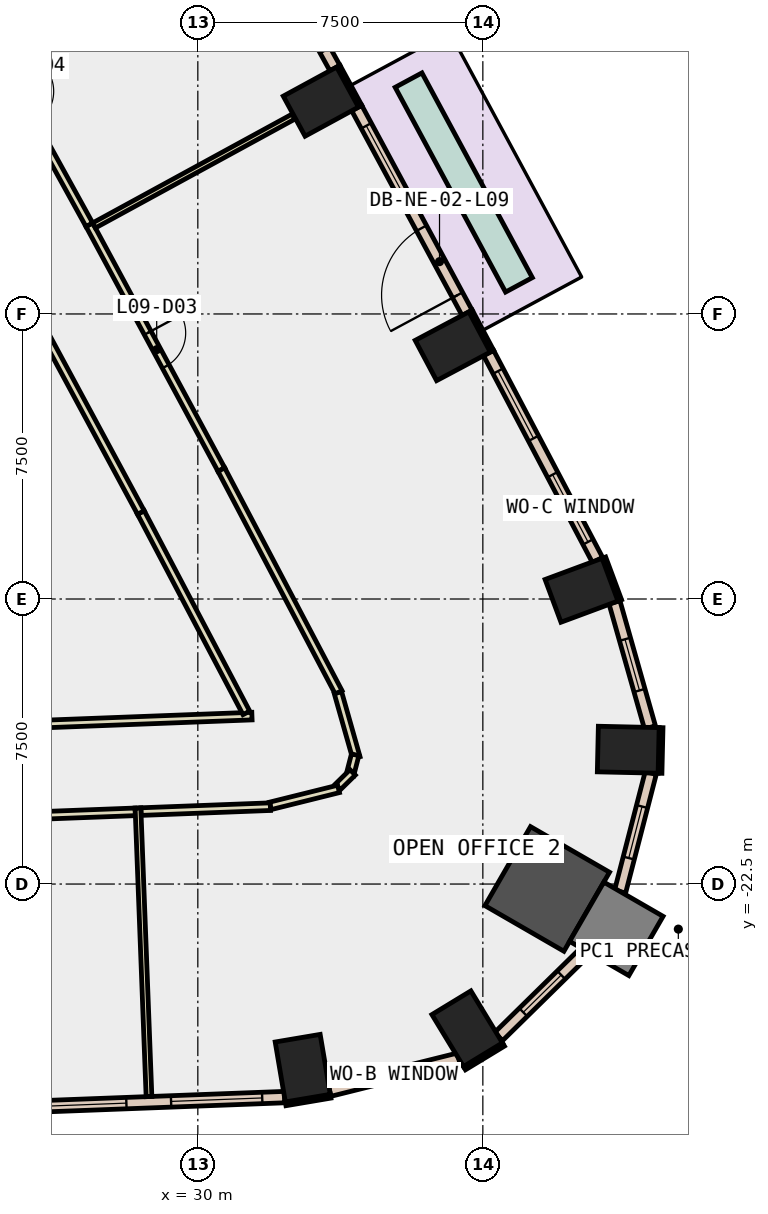
"""IFC4 building model, lengths in metres.
Left out: names, types, materials, properties, quantities, classifications, styles, units other than length and angle.
Written with IfcOpenShell. Run it as: python <this file> out.ifc"""

import sys

from ifc_helpers import new_model, si_unit, direction, frame, frame_2d, origin, origin_2d, place, context, subcontext, project, spatial, rectangle, extrude, element, fill, save


model = new_model("IFC4")
c1 = context("Model", 3, precision=1e-05, world=origin(), true_north=direction((0.0, 1.0)))
c2 = subcontext(c1, "Body", "Model", "MODEL_VIEW")
j1 = project(units=[si_unit("LENGTHUNIT", "METRE"), si_unit("PLANEANGLEUNIT", "RADIAN")], contexts=[c1])
p1 = place(None, origin())
s1 = spatial("IfcSite", under=j1, at=p1, CompositionType="ELEMENT")
p2 = place(p1, origin())
s2 = spatial("IfcBuilding", under=s1, at=p2, CompositionType="ELEMENT")
p3 = place(p2, frame((0.0, 0.0, 47.6)))
s3 = spatial("IfcBuildingStorey", under=s2, at=p3, CompositionType="ELEMENT", Elevation=47.6)
for number, where, z_axis, x_axis in (
    (1, (32.761, -27.345, -0.4), (0.0, 0.0, 1.0), (0.986, 0.167, 0.0)),
    (2, (37.088, -26.307, -0.4), (0.0, 0.0, 1.0), (0.855, 0.519, 0.0)),
):
    element("IfcColumn", number, at=place(p3, frame(where, z_axis=z_axis, x_axis=x_axis)), inside=s3, PredefinedType="COLUMN", context=c2, shape_type="SweptSolid", body=[
        extrude(rectangle(XDim=1.2, YDim=1.6, at=origin_2d()), origin(), (0.0, 0.0, 1.0), 4.2),
    ])
p4 = place(p3, frame((39.194, -22.629, -0.4), z_axis=(0.0, 0.0, 1.0), x_axis=(-0.866025403784, 0.5, 0.0)))
e3 = element("IfcColumn", 3, at=p4, inside=s3, PredefinedType="COLUMN", context=c2, shape_type="SweptSolid", body=[
    extrude(rectangle(XDim=2.4, YDim=2.4, at=origin_2d()), origin(), (0.0, 0.0, 1.0), 4.2),
])
for number, where, z_axis, x_axis in (
    (4, (41.326, -18.966, -0.4), (0.0, 0.0, 1.0), (0.023, 1.0, 0.0)),
    (5, (40.097, -14.77, -0.4), (0.0, 0.0, 1.0), (-0.348, 0.937, 0.0)),
    (6, (36.708, -8.349, -0.4), (0.0, 0.0, 1.0), (-0.469, 0.883, 0.0)),
    (7, (33.238, -1.913, -0.4), (0.0, 0.0, 1.0), (-0.478, 0.878, 0.0)),
):
    element("IfcColumn", number, at=place(p3, frame(where, z_axis=z_axis, x_axis=x_axis)), inside=s3, PredefinedType="COLUMN", context=c2, shape_type="SweptSolid", body=[
        extrude(rectangle(XDim=1.2, YDim=1.6, at=origin_2d()), origin(), (0.0, 0.0, 1.0), 4.2),
    ])
p5 = place(p3, frame((41.013, -23.679, -0.4), z_axis=(0.0, 0.0, 1.0), x_axis=(-0.866025403784, 0.5, 0.0)))
e8 = element("IfcColumn", 8, at=p5, inside=s3, PredefinedType="COLUMN", context=c2, shape_type="SweptSolid", body=[
    extrude(rectangle(XDim=1.8, YDim=1.8, at=origin_2d()), origin(), (0.0, 0.0, 1.0), 4.2),
])
p6 = place(p3, frame((41.103, -15.037, 0.0), z_axis=(0.0, 0.0, 1.0), x_axis=(-0.348268249601, 0.937394914814, 0.0)))
e9 = element("IfcWall", 9, at=p6, inside=s3, PredefinedType="STANDARD", context=c2, shape_type="SweptSolid", body=[
    extrude(rectangle(XDim=1.2, YDim=0.1, at=frame_2d((0.6, 0.0))), origin(), (0.0, 0.0, 1.0), 3.8),
])
p7 = place(p3, frame((37.74, -8.48, 0.0), z_axis=(0.0, 0.0, 1.0), x_axis=(-0.469383408131, 0.882994459876, 0.0)))
e10 = element("IfcWall", 10, at=p7, inside=s3, PredefinedType="STANDARD", context=c2, shape_type="SweptSolid", body=[
    extrude(rectangle(XDim=1.199, YDim=0.1, at=frame_2d((0.6, 0.0))), origin(), (0.0, 0.0, 1.0), 3.8),
])
p8 = place(p3, frame((34.271, -2.034, 0.0), z_axis=(0.0, 0.0, 1.0), x_axis=(-0.478267644701, 0.878214131082, 0.0)))
e11 = element("IfcWall", 11, at=p8, inside=s3, PredefinedType="STANDARD", context=c2, shape_type="SweptSolid", body=[
    extrude(rectangle(XDim=1.2, YDim=0.1, at=frame_2d((0.6, 0.0))), origin(), (0.0, 0.0, 1.0), 3.8),
])
p9 = place(p3, frame((32.311, -28.283, 0.0), z_axis=(0.0, 0.0, 1.0), x_axis=(0.986011774526, 0.166675674579, 0.0)))
e12 = element("IfcWall", 12, at=p9, inside=s3, PredefinedType="STANDARD", context=c2, shape_type="SweptSolid", body=[
    extrude(rectangle(XDim=1.2, YDim=0.1, at=frame_2d((0.6, 0.0))), origin(), (0.0, 0.0, 1.0), 3.8),
])
for number, where, z_axis, x_axis in (
    (13, (37.016, -27.345, 0.0), (0.0, 0.0, 1.0), (0.855, 0.519, 0.0)),
    (14, (42.162, -19.585, 0.0), (0.0, 0.0, 1.0), (0.023, 1.0, 0.0)),
):
    element("IfcWall", number, at=place(p3, frame(where, z_axis=z_axis, x_axis=x_axis)), inside=s3, PredefinedType="STANDARD", context=c2, shape_type="SweptSolid", body=[
        extrude(rectangle(XDim=1.2, YDim=0.1, at=frame_2d((0.6, 0.0))), origin(), (0.0, 0.0, 1.0), 3.8),
    ])
p10 = place(p3, frame((25.134, -28.378, 0.0), z_axis=(0.0, 0.0, 1.0), x_axis=(0.999276920032, 0.038021534562, 0.0)))
e15 = element("IfcWall", 15, at=p10, inside=s3, PredefinedType="STANDARD", context=c2, shape_type="SweptSolid", body=[
    extrude(rectangle(XDim=7.153, YDim=0.3, at=frame_2d((3.577, 0.0))), origin(), (0.0, 0.0, 1.0), 3.8),
])
p11 = place(p10, frame((0.588, 0.0, 0.9)))
e16 = element("IfcOpeningElement", 16, at=p11, cuts=e15, PredefinedType="OPENING", context=c2, shape_type="SweptSolid", body=[
    extrude(rectangle(XDim=2.4, YDim=2.6, at=frame_2d((1.2, 1.3))), frame((0.0, 0.16, 0.0), z_axis=(0.0, -1.0, 0.0), x_axis=(1.0, 0.0, 0.0)), (0.0, 0.0, 1.0), 0.32),
])
p12 = place(p10, frame((4.165, 0.0, 0.9)))
e17 = element("IfcOpeningElement", 17, at=p12, cuts=e15, PredefinedType="OPENING", context=c2, shape_type="SweptSolid", body=[
    extrude(rectangle(XDim=2.4, YDim=2.6, at=frame_2d((1.2, 1.3))), frame((0.0, 0.16, 0.0), z_axis=(0.0, -1.0, 0.0), x_axis=(1.0, 0.0, 0.0)), (0.0, 0.0, 1.0), 0.32),
])
p13 = place(p3, frame((33.469, -27.939, 0.0), z_axis=(0.0, 0.0, 1.0), x_axis=(0.970331016871, 0.241780308749, 0.0)))
e18 = element("IfcWall", 18, at=p13, inside=s3, PredefinedType="STANDARD", context=c2, shape_type="SweptSolid", body=[
    extrude(rectangle(XDim=3.499, YDim=0.3, at=frame_2d((1.75, 0.0))), origin(), (0.0, 0.0, 1.0), 3.8),
])
p14 = place(p13, frame((1.049, 0.0, 0.9)))
e19 = element("IfcOpeningElement", 19, at=p14, cuts=e18, PredefinedType="OPENING", context=c2, shape_type="SweptSolid", body=[
    extrude(rectangle(XDim=1.4, YDim=2.6, at=frame_2d((0.7, 1.3))), frame((0.0, 0.16, 0.0), z_axis=(0.0, -1.0, 0.0), x_axis=(1.0, 0.0, 0.0)), (0.0, 0.0, 1.0), 0.32),
])
p15 = place(p3, frame((37.914, -26.513, 0.0), z_axis=(0.0, 0.0, 1.0), x_axis=(0.71340487189, 0.700752087948, 0.0)))
e20 = element("IfcWall", 20, at=p15, inside=s3, PredefinedType="STANDARD", context=c2, shape_type="SweptSolid", body=[
    extrude(rectangle(XDim=3.222, YDim=0.3, at=frame_2d((1.611, 0.0))), origin(), (0.0, 0.0, 1.0), 3.8),
])
p16 = place(p15, frame((0.911, 0.0, 0.9)))
e21 = element("IfcOpeningElement", 21, at=p16, cuts=e20, PredefinedType="OPENING", context=c2, shape_type="SweptSolid", body=[
    extrude(rectangle(XDim=1.4, YDim=2.6, at=frame_2d((0.7, 1.3))), frame((0.0, 0.16, 0.0), z_axis=(0.0, -1.0, 0.0), x_axis=(1.0, 0.0, 0.0)), (0.0, 0.0, 1.0), 0.32),
])
p17 = place(p3, frame((41.112, -22.698, 0.0), z_axis=(0.0, 0.0, 1.0), x_axis=(0.250086521833, 0.968223492587, 0.0)))
e22 = element("IfcWall", 22, at=p17, inside=s3, PredefinedType="STANDARD", context=c2, shape_type="SweptSolid", body=[
    extrude(rectangle(XDim=3.222, YDim=0.3, at=frame_2d((1.611, 0.0))), origin(), (0.0, 0.0, 1.0), 3.8),
])
p18 = place(p17, frame((0.911, 0.0, 0.9)))
e23 = element("IfcOpeningElement", 23, at=p18, cuts=e22, PredefinedType="OPENING", context=c2, shape_type="SweptSolid", body=[
    extrude(rectangle(XDim=1.4, YDim=2.6, at=frame_2d((0.7, 1.3))), frame((0.0, 0.16, 0.0), z_axis=(0.0, -1.0, 0.0), x_axis=(1.0, 0.0, 0.0)), (0.0, 0.0, 1.0), 0.32),
])
p19 = place(p3, frame((41.898, -18.379, 0.0), z_axis=(0.0, 0.0, 1.0), x_axis=(-0.272901963142, 0.962041848629, 0.0)))
e24 = element("IfcWall", 24, at=p19, inside=s3, PredefinedType="STANDARD", context=c2, shape_type="SweptSolid", body=[
    extrude(rectangle(XDim=3.422, YDim=0.3, at=frame_2d((1.711, 0.0))), origin(), (0.0, 0.0, 1.0), 3.8),
])
p20 = place(p19, frame((1.011, 0.0, 0.9)))
e25 = element("IfcOpeningElement", 25, at=p20, cuts=e24, PredefinedType="OPENING", context=c2, shape_type="SweptSolid", body=[
    extrude(rectangle(XDim=1.4, YDim=2.6, at=frame_2d((0.7, 1.3))), frame((0.0, 0.16, 0.0), z_axis=(0.0, -1.0, 0.0), x_axis=(1.0, 0.0, 0.0)), (0.0, 0.0, 1.0), 0.32),
])
p21 = place(p3, frame((40.518, -13.975, 0.0), z_axis=(0.0, 0.0, 1.0), x_axis=(-0.465847756605, 0.884864886673, 0.0)))
e26 = element("IfcWall", 26, at=p21, inside=s3, PredefinedType="STANDARD", context=c2, shape_type="SweptSolid", body=[
    extrude(rectangle(XDim=6.157, YDim=0.3, at=frame_2d((3.079, 0.0))), origin(), (0.0, 0.0, 1.0), 3.8),
])
p22 = place(p21, frame((0.539, 0.0, 0.9)))
e27 = element("IfcOpeningElement", 27, at=p22, cuts=e26, PredefinedType="OPENING", context=c2, shape_type="SweptSolid", body=[
    extrude(rectangle(XDim=2.0, YDim=2.6, at=frame_2d((1.0, 1.3))), frame((0.0, 0.16, 0.0), z_axis=(0.0, -1.0, 0.0), x_axis=(1.0, 0.0, 0.0)), (0.0, 0.0, 1.0), 0.32),
])
p23 = place(p21, frame((3.618, 0.0, 0.9)))
e28 = element("IfcOpeningElement", 28, at=p23, cuts=e26, PredefinedType="OPENING", context=c2, shape_type="SweptSolid", body=[
    extrude(rectangle(XDim=2.0, YDim=2.6, at=frame_2d((1.0, 1.3))), frame((0.0, 0.16, 0.0), z_axis=(0.0, -1.0, 0.0), x_axis=(1.0, 0.0, 0.0)), (0.0, 0.0, 1.0), 0.32),
])
p24 = place(p3, frame((37.086, -7.47, 0.0), z_axis=(0.0, 0.0, 1.0), x_axis=(-0.474584950749, 0.880209704856, 0.0)))
e29 = element("IfcWall", 29, at=p24, inside=s3, PredefinedType="STANDARD", context=c2, shape_type="SweptSolid", body=[
    extrude(rectangle(XDim=6.121, YDim=0.3, at=frame_2d((3.061, 0.0))), origin(), (0.0, 0.0, 1.0), 3.8),
])
p25 = place(p24, frame((0.53, 0.0, 0.0)))
e30 = element("IfcOpeningElement", 30, at=p25, cuts=e29, PredefinedType="OPENING", context=c2, shape_type="SweptSolid", body=[
    extrude(rectangle(XDim=2.0, YDim=2.4, at=frame_2d((1.0, 1.2))), frame((0.0, 0.16, 0.0), z_axis=(0.0, -1.0, 0.0), x_axis=(1.0, 0.0, 0.0)), (0.0, 0.0, 1.0), 0.32),
])
p26 = place(p24, frame((3.591, 0.0, 0.9)))
e31 = element("IfcOpeningElement", 31, at=p26, cuts=e29, PredefinedType="OPENING", context=c2, shape_type="SweptSolid", body=[
    extrude(rectangle(XDim=2.0, YDim=2.6, at=frame_2d((1.0, 1.3))), frame((0.0, 0.16, 0.0), z_axis=(0.0, -1.0, 0.0), x_axis=(1.0, 0.0, 0.0)), (0.0, 0.0, 1.0), 0.32),
])
p27 = place(p3, frame((33.607, -1.03, 0.0), z_axis=(0.0, 0.0, 1.0), x_axis=(-0.483195456594, 0.875512507465, 0.0)))
e32 = element("IfcWall", 32, at=p27, inside=s3, PredefinedType="STANDARD", context=c2, shape_type="SweptSolid", body=[
    extrude(rectangle(XDim=6.12, YDim=0.3, at=frame_2d((3.06, 0.0))), origin(), (0.0, 0.0, 1.0), 3.8),
])
p28 = place(p27, frame((0.53, 0.0, 0.9)))
e33 = element("IfcOpeningElement", 33, at=p28, cuts=e32, PredefinedType="OPENING", context=c2, shape_type="SweptSolid", body=[
    extrude(rectangle(XDim=2.0, YDim=2.6, at=frame_2d((1.0, 1.3))), frame((0.0, 0.16, 0.0), z_axis=(0.0, -1.0, 0.0), x_axis=(1.0, 0.0, 0.0)), (0.0, 0.0, 1.0), 0.32),
])
p29 = place(p27, frame((3.59, 0.0, 0.9)))
e34 = element("IfcOpeningElement", 34, at=p29, cuts=e32, PredefinedType="OPENING", context=c2, shape_type="SweptSolid", body=[
    extrude(rectangle(XDim=2.0, YDim=2.6, at=frame_2d((1.0, 1.3))), frame((0.0, 0.16, 0.0), z_axis=(0.0, -1.0, 0.0), x_axis=(1.0, 0.0, 0.0)), (0.0, 0.0, 1.0), 0.32),
])
p30 = place(p3, frame((38.45, -6.734, 0.0), z_axis=(0.0, 0.0, 1.0), x_axis=(-0.474651603139, 0.880173764456, 0.0)))
e35 = element("IfcWall", 35, at=p30, inside=s3, PredefinedType="STANDARD", context=c2, shape_type="SweptSolid", body=[
    extrude(rectangle(XDim=6.12, YDim=0.8, at=frame_2d((3.06, 0.0))), origin(), (0.0, 0.0, 1.0), 0.8),
])
p31 = place(p3, frame((24.208, -18.356, 0.0), z_axis=(0.0, 0.0, 1.0), x_axis=(0.999275140761, 0.03806826838, 0.0)))
e36 = element("IfcWall", 36, at=p31, inside=s3, PredefinedType="PARTITIONING", context=c2, shape_type="SweptSolid", body=[
    extrude(rectangle(XDim=7.221, YDim=0.2, at=frame_2d((3.611, 0.0))), origin(), (0.0, 0.0, 1.0), 3.8),
])
p32 = place(p3, frame((31.277, -17.997, 0.0), z_axis=(0.0, 0.0, 1.0), x_axis=(-0.465862938277, 0.884856893933, 0.0)))
e37 = element("IfcWall", 37, at=p32, inside=s3, PredefinedType="PARTITIONING", context=c2, shape_type="SweptSolid", body=[
    extrude(rectangle(XDim=5.959, YDim=0.2, at=frame_2d((2.979, 0.0))), origin(), (0.0, 0.0, 1.0), 3.8),
])
p33 = place(p3, frame((28.501, -12.724, 0.0), z_axis=(0.0, 0.0, 1.0), x_axis=(-0.474575559827, 0.880214768119, 0.0)))
e38 = element("IfcWall", 38, at=p33, inside=s3, PredefinedType="PARTITIONING", context=c2, shape_type="SweptSolid", body=[
    extrude(rectangle(XDim=7.221, YDim=0.2, at=frame_2d((3.611, 0.0))), origin(), (0.0, 0.0, 1.0), 3.8),
])
p34 = place(p3, frame((28.354, -20.6, 0.0), z_axis=(0.0, 0.0, 1.0), x_axis=(-0.999276945714, -0.038020859604, 0.0)))
e39 = element("IfcWall", 39, at=p34, inside=s3, PredefinedType="PARTITIONING", context=c2, shape_type="SweptSolid", body=[
    extrude(rectangle(XDim=4.071, YDim=0.2, at=frame_2d((2.036, 0.0))), origin(), (0.0, 0.0, 1.0), 3.8),
])
p35 = place(p3, frame((27.145, -5.152, 0.0), z_axis=(0.0, 0.0, 1.0), x_axis=(0.474591029089, -0.880206427554, 0.0)))
e40 = element("IfcWall", 40, at=p35, inside=s3, PredefinedType="PARTITIONING", context=c2, shape_type="SweptSolid", body=[
    extrude(rectangle(XDim=7.32, YDim=0.2, at=frame_2d((3.66, 0.0))), origin(), (0.0, 0.0, 1.0), 3.8),
])
p36 = place(p35, frame((3.235, 0.0, 0.0)))
e41 = element("IfcOpeningElement", 41, at=p36, cuts=e40, PredefinedType="OPENING", context=c2, shape_type="SweptSolid", body=[
    extrude(rectangle(XDim=1.0, YDim=2.1, at=frame_2d((0.5, 1.05))), frame((0.0, 0.11, 0.0), z_axis=(0.0, -1.0, 0.0), x_axis=(1.0, 0.0, 0.0)), (0.0, 0.0, 1.0), 0.22),
])
p37 = place(p3, frame((30.619, -11.595, 0.0), z_axis=(0.0, 0.0, 1.0), x_axis=(0.465905874098, -0.884834287582, 0.0)))
e42 = element("IfcWall", 42, at=p37, inside=s3, PredefinedType="PARTITIONING", context=c2, shape_type="SweptSolid", body=[
    extrude(rectangle(XDim=6.626, YDim=0.2, at=frame_2d((3.313, 0.0))), origin(), (0.0, 0.0, 1.0), 3.8),
])
p38 = place(p3, frame((33.687, -17.466, 0.0), z_axis=(0.0, 0.0, 1.0), x_axis=(0.272780480932, -0.962076301144, 0.0)))
e43 = element("IfcWall", 43, at=p38, inside=s3, PredefinedType="PARTITIONING", context=c2, shape_type="SweptSolid", body=[
    extrude(rectangle(XDim=1.778, YDim=0.2, at=frame_2d((0.889, 0.0))), origin(), (0.0, 0.0, 1.0), 3.8),
])
p39 = place(p3, frame((34.14, -19.099, 0.0), z_axis=(0.0, 0.0, 1.0), x_axis=(-0.249326881699, -0.968419385423, 0.0)))
e44 = element("IfcWall", 44, at=p39, inside=s3, PredefinedType="PARTITIONING", context=c2, shape_type="SweptSolid", body=[
    extrude(rectangle(XDim=0.549, YDim=0.2, at=frame_2d((0.275, 0.0))), origin(), (0.0, 0.0, 1.0), 3.8),
])
p40 = place(p3, frame((34.074, -19.562, 0.0), z_axis=(0.0, 0.0, 1.0), x_axis=(-0.713456013967, -0.700700018649, 0.0)))
e45 = element("IfcWall", 45, at=p40, inside=s3, PredefinedType="PARTITIONING", context=c2, shape_type="SweptSolid", body=[
    extrude(rectangle(XDim=0.555, YDim=0.2, at=frame_2d((0.277, 0.0))), origin(), (0.0, 0.0, 1.0), 3.8),
])
p41 = place(p3, frame((33.703, -19.997, 0.0), z_axis=(0.0, 0.0, 1.0), x_axis=(-0.970421070494, -0.241418611423, 0.0)))
e46 = element("IfcWall", 46, at=p41, inside=s3, PredefinedType="PARTITIONING", context=c2, shape_type="SweptSolid", body=[
    extrude(rectangle(XDim=1.852, YDim=0.2, at=frame_2d((0.926, 0.0))), origin(), (0.0, 0.0, 1.0), 3.8),
])
p42 = place(p3, frame((31.909, -20.464, 0.0), z_axis=(0.0, 0.0, 1.0), x_axis=(-0.999273295147, -0.038116684091, 0.0)))
e47 = element("IfcWall", 47, at=p42, inside=s3, PredefinedType="PARTITIONING", context=c2, shape_type="SweptSolid", body=[
    extrude(rectangle(XDim=3.407, YDim=0.2, at=frame_2d((1.704, 0.0))), origin(), (0.0, 0.0, 1.0), 3.8),
])
p43 = place(p3, frame((23.681, 1.124, 0.0), z_axis=(0.0, 0.0, 1.0), x_axis=(0.483125061868, -0.875551354631, 0.0)))
e48 = element("IfcWall", 48, at=p43, inside=s3, PredefinedType="PARTITIONING", context=c2, shape_type="SweptSolid", body=[
    extrude(rectangle(XDim=7.168, YDim=0.2, at=frame_2d((3.584, 0.0))), origin(), (0.0, 0.0, 1.0), 3.8),
])
p44 = place(p43, frame((3.159, 0.0, 0.0)))
e49 = element("IfcOpeningElement", 49, at=p44, cuts=e48, PredefinedType="OPENING", context=c2, shape_type="SweptSolid", body=[
    extrude(rectangle(XDim=1.0, YDim=2.1, at=frame_2d((0.5, 1.05))), frame((0.0, 0.11, 0.0), z_axis=(0.0, -1.0, 0.0), x_axis=(1.0, 0.0, 0.0)), (0.0, 0.0, 1.0), 0.22),
])
p45 = place(p3, frame((28.425, -20.497, 0.0), z_axis=(0.0, 0.0, 1.0), x_axis=(0.03816049016, -0.999271623229, 0.0)))
e50 = element("IfcWall", 50, at=p45, inside=s3, PredefinedType="PARTITIONING", context=c2, shape_type="SweptSolid", body=[
    extrude(rectangle(XDim=7.601, YDim=0.15, at=frame_2d((3.8, 0.0))), origin(), (0.0, 0.0, 1.0), 3.8),
])
p46 = place(p3, frame((27.268, -5.171, 0.0), z_axis=(0.0, 0.0, 1.0), x_axis=(0.877837854343, 0.478957932895, 0.0)))
e51 = element("IfcWall", 51, at=p46, inside=s3, PredefinedType="PARTITIONING", context=c2, shape_type="SweptSolid", body=[
    extrude(rectangle(XDim=5.982, YDim=0.15, at=frame_2d((2.991, 0.0))), origin(), (0.0, 0.0, 1.0), 3.8),
])
p47 = place(p11, origin())
e52 = element("IfcWindow", 52, at=p47, inside=s3, PartitioningType="SINGLE_PANEL", PredefinedType="WINDOW", context=c2, shape_type="SweptSolid", body=[
    extrude(rectangle(XDim=2.4, YDim=2.6, at=frame_2d((1.2, 1.3))), frame((0.0, 0.03, 0.0), z_axis=(0.0, -1.0, 0.0), x_axis=(1.0, 0.0, 0.0)), (0.0, 0.0, 1.0), 0.06),
])
fill(e16, e52)
p48 = place(p12, origin())
e53 = element("IfcWindow", 53, at=p48, inside=s3, PartitioningType="SINGLE_PANEL", PredefinedType="WINDOW", context=c2, shape_type="SweptSolid", body=[
    extrude(rectangle(XDim=2.4, YDim=2.6, at=frame_2d((1.2, 1.3))), frame((0.0, 0.03, 0.0), z_axis=(0.0, -1.0, 0.0), x_axis=(1.0, 0.0, 0.0)), (0.0, 0.0, 1.0), 0.06),
])
fill(e17, e53)
p49 = place(p14, origin())
e54 = element("IfcWindow", 54, at=p49, inside=s3, PartitioningType="SINGLE_PANEL", PredefinedType="WINDOW", context=c2, shape_type="SweptSolid", body=[
    extrude(rectangle(XDim=1.4, YDim=2.6, at=frame_2d((0.7, 1.3))), frame((0.0, 0.03, 0.0), z_axis=(0.0, -1.0, 0.0), x_axis=(1.0, 0.0, 0.0)), (0.0, 0.0, 1.0), 0.06),
])
fill(e19, e54)
p50 = place(p16, origin())
e55 = element("IfcWindow", 55, at=p50, inside=s3, PartitioningType="SINGLE_PANEL", PredefinedType="WINDOW", context=c2, shape_type="SweptSolid", body=[
    extrude(rectangle(XDim=1.4, YDim=2.6, at=frame_2d((0.7, 1.3))), frame((0.0, 0.03, 0.0), z_axis=(0.0, -1.0, 0.0), x_axis=(1.0, 0.0, 0.0)), (0.0, 0.0, 1.0), 0.06),
])
fill(e21, e55)
p51 = place(p18, origin())
e56 = element("IfcWindow", 56, at=p51, inside=s3, PartitioningType="SINGLE_PANEL", PredefinedType="WINDOW", context=c2, shape_type="SweptSolid", body=[
    extrude(rectangle(XDim=1.4, YDim=2.6, at=frame_2d((0.7, 1.3))), frame((0.0, 0.03, 0.0), z_axis=(0.0, -1.0, 0.0), x_axis=(1.0, 0.0, 0.0)), (0.0, 0.0, 1.0), 0.06),
])
fill(e23, e56)
p52 = place(p20, origin())
e57 = element("IfcWindow", 57, at=p52, inside=s3, PartitioningType="SINGLE_PANEL", PredefinedType="WINDOW", context=c2, shape_type="SweptSolid", body=[
    extrude(rectangle(XDim=1.4, YDim=2.6, at=frame_2d((0.7, 1.3))), frame((0.0, 0.03, 0.0), z_axis=(0.0, -1.0, 0.0), x_axis=(1.0, 0.0, 0.0)), (0.0, 0.0, 1.0), 0.06),
])
fill(e25, e57)
p53 = place(p22, origin())
e58 = element("IfcWindow", 58, at=p53, inside=s3, PartitioningType="SINGLE_PANEL", PredefinedType="WINDOW", context=c2, shape_type="SweptSolid", body=[
    extrude(rectangle(XDim=2.0, YDim=2.6, at=frame_2d((1.0, 1.3))), frame((0.0, 0.03, 0.0), z_axis=(0.0, -1.0, 0.0), x_axis=(1.0, 0.0, 0.0)), (0.0, 0.0, 1.0), 0.06),
])
fill(e27, e58)
p54 = place(p23, origin())
e59 = element("IfcWindow", 59, at=p54, inside=s3, PartitioningType="SINGLE_PANEL", PredefinedType="WINDOW", context=c2, shape_type="SweptSolid", body=[
    extrude(rectangle(XDim=2.0, YDim=2.6, at=frame_2d((1.0, 1.3))), frame((0.0, 0.03, 0.0), z_axis=(0.0, -1.0, 0.0), x_axis=(1.0, 0.0, 0.0)), (0.0, 0.0, 1.0), 0.06),
])
fill(e28, e59)
p55 = place(p25, origin())
e60 = element("IfcDoor", 60, at=p55, inside=s3, OperationType="SLIDING_TO_LEFT", PredefinedType="DOOR", context=c2, shape_type="SweptSolid", body=[
    extrude(rectangle(XDim=2.0, YDim=2.4, at=frame_2d((1.0, 1.2))), frame((0.0, 0.025, 0.0), z_axis=(0.0, -1.0, 0.0), x_axis=(1.0, 0.0, 0.0)), (0.0, 0.0, 1.0), 0.05),
])
fill(e30, e60)
p56 = place(p26, origin())
e61 = element("IfcWindow", 61, at=p56, inside=s3, PartitioningType="SINGLE_PANEL", PredefinedType="WINDOW", context=c2, shape_type="SweptSolid", body=[
    extrude(rectangle(XDim=2.0, YDim=2.6, at=frame_2d((1.0, 1.3))), frame((0.0, 0.03, 0.0), z_axis=(0.0, -1.0, 0.0), x_axis=(1.0, 0.0, 0.0)), (0.0, 0.0, 1.0), 0.06),
])
fill(e31, e61)
p57 = place(p36, origin())
e62 = element("IfcDoor", 62, at=p57, inside=s3, OperationType="SINGLE_SWING_RIGHT", PredefinedType="DOOR", context=c2, shape_type="SweptSolid", body=[
    extrude(rectangle(XDim=1.0, YDim=2.1, at=frame_2d((0.5, 1.05))), frame((0.0, 0.025, 0.0), z_axis=(0.0, -1.0, 0.0), x_axis=(1.0, 0.0, 0.0)), (0.0, 0.0, 1.0), 0.05),
])
fill(e41, e62)
save(model, sys.argv[1])
